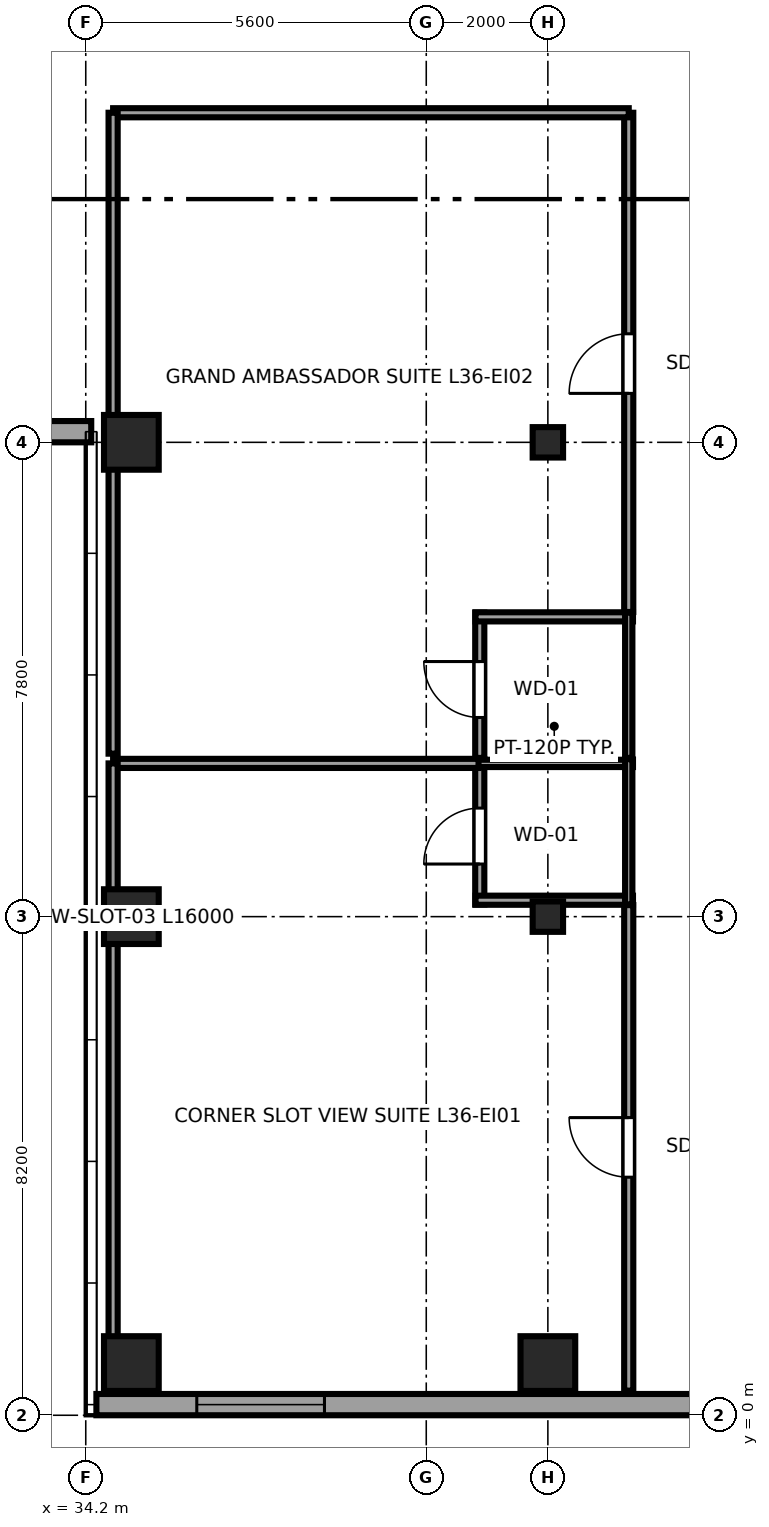
"""IFC4 building model, lengths in metres.
Left out: names, types, materials, properties, quantities, classifications, styles, units other than length and angle.
Written with IfcOpenShell. Run it as: python <this file> out.ifc"""

import sys

from ifc_helpers import new_model, si_unit, direction, frame, frame_2d, origin, origin_2d, place, context, subcontext, project, spatial, rectangle, i_section, extrude, source, transform, mapped, element, fill, save


model = new_model("IFC4")
c1 = context("Model", 3, precision=1e-05, world=origin(), true_north=direction((0.0, 1.0)))
c2 = subcontext(c1, "Body", "Model", "MODEL_VIEW")
j1 = project(units=[si_unit("LENGTHUNIT", "METRE"), si_unit("PLANEANGLEUNIT", "RADIAN")], contexts=[c1])
p1 = place(None, origin())
s1 = spatial("IfcSite", under=j1, at=p1, CompositionType="ELEMENT")
p2 = place(p1, origin())
s2 = spatial("IfcBuilding", under=s1, at=p2, CompositionType="ELEMENT")
p3 = place(p2, frame((0.0, 0.0, 139.95)))
s3 = spatial("IfcBuildingStorey", under=s2, at=p3, CompositionType="ELEMENT", Elevation=139.95)
m1 = source(origin(), c2, "Body", "SweptSolid", [
    extrude(rectangle(XDim=0.9, YDim=0.9, at=origin_2d()), origin(), (0.0, 0.0, 1.0), 3.55),
])
for number, where, z_axis, x_axis in (
    (1, (34.95, 0.85, 0.0), (0.0, 0.0, 1.0), (1.0, 0.0, 0.0)),
    (2, (34.95, 8.2, 0.0), (0.0, 0.0, 1.0), (1.0, 0.0, 0.0)),
    (3, (34.95, 16.0, 0.0), (0.0, 0.0, 1.0), (1.0, 0.0, 0.0)),
    (4, (41.8, 0.85, 0.0), (0.0, 0.0, 1.0), (1.0, 0.0, 0.0)),
):
    element("IfcColumn", number, at=place(p3, frame(where, z_axis=z_axis, x_axis=x_axis)), inside=s3, PredefinedType="COLUMN", context=c2, shape_type="MappedRepresentation", body=[
        mapped(m1, transform((0.0, 0.0, 0.0), x_axis=(1.0, 0.0, 0.0), y_axis=(0.0, 1.0, 0.0), z_axis=(0.0, 0.0, 1.0), scale=1.0)),
    ])
m2 = source(origin(), c2, "Body", "SweptSolid", [
    extrude(i_section(OverallWidth=0.5, OverallDepth=0.5, WebThickness=0.022, FlangeThickness=0.034, at=origin_2d()), origin(), (0.0, 0.0, 1.0), 3.55),
])
for number, where, z_axis, x_axis in (
    (5, (41.8, 8.2, 0.0), (0.0, 0.0, 1.0), (1.0, 0.0, 0.0)),
    (6, (41.8, 16.0, 0.0), (0.0, 0.0, 1.0), (1.0, 0.0, 0.0)),
):
    element("IfcColumn", number, at=place(p3, frame(where, z_axis=z_axis, x_axis=x_axis)), inside=s3, PredefinedType="COLUMN", context=c2, shape_type="MappedRepresentation", body=[
        mapped(m2, transform((0.0, 0.0, 0.0), x_axis=(1.0, 0.0, 0.0), y_axis=(0.0, 1.0, 0.0), z_axis=(0.0, 0.0, 1.0), scale=1.0)),
    ])
p4 = place(p3, frame((22.71, 16.175, 0.0), z_axis=(0.0, 0.0, 1.0), x_axis=(1.0, 0.0, 0.0)))
e7 = element("IfcWall", 7, at=p4, inside=s3, PredefinedType="SOLIDWALL", context=c2, shape_type="SweptSolid", body=[
    extrude(rectangle(XDim=11.58, YDim=0.35, at=frame_2d((5.79, 0.0))), origin(), (0.0, 0.0, 1.0), 2.748),
])
p5 = place(p4, frame((2.145, 0.0, 0.68)))
e8 = element("IfcOpeningElement", 8, at=p5, cuts=e7, PredefinedType="OPENING", context=c2, shape_type="SweptSolid", body=[
    extrude(rectangle(XDim=2.1, YDim=1.9, at=frame_2d((1.05, 0.95))), frame((0.0, 0.185, 0.0), z_axis=(0.0, -1.0, 0.0), x_axis=(1.0, 0.0, 0.0)), (0.0, 0.0, 1.0), 0.37),
])
p6 = place(p4, frame((7.335, 0.0, 0.68)))
e9 = element("IfcOpeningElement", 9, at=p6, cuts=e7, PredefinedType="OPENING", context=c2, shape_type="SweptSolid", body=[
    extrude(rectangle(XDim=2.1, YDim=1.9, at=frame_2d((1.05, 0.95))), frame((0.0, 0.185, 0.0), z_axis=(0.0, -1.0, 0.0), x_axis=(1.0, 0.0, 0.0)), (0.0, 0.0, 1.0), 0.37),
])
p7 = place(p3, frame((34.375, 0.175, 0.0), z_axis=(0.0, 0.0, 1.0), x_axis=(1.0, 0.0, 0.0)))
e10 = element("IfcWall", 10, at=p7, inside=s3, PredefinedType="SOLIDWALL", context=c2, shape_type="SweptSolid", body=[
    extrude(rectangle(XDim=18.008, YDim=0.35, at=frame_2d((9.004, 0.0))), origin(), (0.0, 0.0, 1.0), 3.37),
])
p8 = place(p7, frame((1.651, 0.0, 0.68)))
e11 = element("IfcOpeningElement", 11, at=p8, cuts=e10, PredefinedType="OPENING", context=c2, shape_type="SweptSolid", body=[
    extrude(rectangle(XDim=2.1, YDim=1.9, at=frame_2d((1.05, 0.95))), frame((0.0, 0.185, 0.0), z_axis=(0.0, -1.0, 0.0), x_axis=(1.0, 0.0, 0.0)), (0.0, 0.0, 1.0), 0.37),
])
p9 = place(p7, frame((11.105, 0.0, 0.68)))
e12 = element("IfcOpeningElement", 12, at=p9, cuts=e10, PredefinedType="OPENING", context=c2, shape_type="SweptSolid", body=[
    extrude(rectangle(XDim=2.1, YDim=1.9, at=frame_2d((1.05, 0.95))), frame((0.0, 0.185, 0.0), z_axis=(0.0, -1.0, 0.0), x_axis=(1.0, 0.0, 0.0)), (0.0, 0.0, 1.0), 0.37),
])
p10 = place(p3, frame((40.68, 8.4, 0.0), z_axis=(0.0, 0.0, 1.0), x_axis=(0.0, 1.0, 0.0)))
e13 = element("IfcWall", 13, at=p10, inside=s3, PredefinedType="PARTITIONING", context=c2, shape_type="SweptSolid", body=[
    extrude(rectangle(XDim=2.39, YDim=0.15, at=frame_2d((1.195, 0.0))), origin(), (0.0, 0.0, 1.0), 3.37),
])
p11 = place(p10, frame((0.665, 0.0, 0.0)))
e14 = element("IfcOpeningElement", 14, at=p11, cuts=e13, PredefinedType="OPENING", context=c2, shape_type="SweptSolid", body=[
    extrude(rectangle(XDim=0.92, YDim=2.01, at=frame_2d((0.46, 1.005))), frame((0.0, 0.085, 0.0), z_axis=(0.0, -1.0, 0.0), x_axis=(1.0, 0.0, 0.0)), (0.0, 0.0, 1.0), 0.17),
])
p12 = place(p3, frame((40.61, 8.47, 0.0), z_axis=(0.0, 0.0, 1.0), x_axis=(1.0, 0.0, 0.0)))
e15 = element("IfcWall", 15, at=p12, inside=s3, PredefinedType="PARTITIONING", context=c2, shape_type="SweptSolid", body=[
    extrude(rectangle(XDim=2.59, YDim=0.15, at=frame_2d((1.295, 0.0))), origin(), (0.0, 0.0, 1.0), 3.37),
])
p13 = place(p3, frame((40.61, 10.72, 0.0), z_axis=(0.0, 0.0, 1.0), x_axis=(1.0, 0.0, 0.0)))
e16 = element("IfcWall", 16, at=p13, inside=s3, PredefinedType="PLUMBINGWALL", context=c2, shape_type="SweptSolid", body=[
    extrude(rectangle(XDim=2.59, YDim=0.12, at=frame_2d((1.295, 0.0))), origin(), (0.0, 0.0, 1.0), 3.37),
])
p14 = place(p3, frame((43.13, 8.4, 0.0), z_axis=(0.0, 0.0, 1.0), x_axis=(0.0, 1.0, 0.0)))
e17 = element("IfcWall", 17, at=p14, inside=s3, PredefinedType="PLUMBINGWALL", context=c2, shape_type="SweptSolid", body=[
    extrude(rectangle(XDim=2.39, YDim=0.12, at=frame_2d((1.195, 0.0))), origin(), (0.0, 0.0, 1.0), 3.37),
])
p15 = place(p3, frame((40.68, 10.81, 0.0), z_axis=(0.0, 0.0, 1.0), x_axis=(0.0, 1.0, 0.0)))
e18 = element("IfcWall", 18, at=p15, inside=s3, PredefinedType="PARTITIONING", context=c2, shape_type="SweptSolid", body=[
    extrude(rectangle(XDim=2.39, YDim=0.15, at=frame_2d((1.195, 0.0))), origin(), (0.0, 0.0, 1.0), 3.37),
])
p16 = place(p15, frame((0.665, 0.0, 0.0)))
e19 = element("IfcOpeningElement", 19, at=p16, cuts=e18, PredefinedType="OPENING", context=c2, shape_type="SweptSolid", body=[
    extrude(rectangle(XDim=0.92, YDim=2.01, at=frame_2d((0.46, 1.005))), frame((0.0, 0.085, 0.0), z_axis=(0.0, -1.0, 0.0), x_axis=(1.0, 0.0, 0.0)), (0.0, 0.0, 1.0), 0.17),
])
p17 = place(p3, frame((40.61, 13.13, 0.0), z_axis=(0.0, 0.0, 1.0), x_axis=(1.0, 0.0, 0.0)))
e20 = element("IfcWall", 20, at=p17, inside=s3, PredefinedType="PARTITIONING", context=c2, shape_type="SweptSolid", body=[
    extrude(rectangle(XDim=2.59, YDim=0.15, at=frame_2d((1.295, 0.0))), origin(), (0.0, 0.0, 1.0), 3.37),
])
p18 = place(p3, frame((43.13, 10.81, 0.0), z_axis=(0.0, 0.0, 1.0), x_axis=(0.0, 1.0, 0.0)))
e21 = element("IfcWall", 21, at=p18, inside=s3, PredefinedType="PLUMBINGWALL", context=c2, shape_type="SweptSolid", body=[
    extrude(rectangle(XDim=2.39, YDim=0.12, at=frame_2d((1.195, 0.0))), origin(), (0.0, 0.0, 1.0), 3.37),
])
p19 = place(p3, frame((43.13, 0.405, 0.0), z_axis=(0.0, 0.0, 1.0), x_axis=(0.0, 1.0, 0.0)))
e22 = element("IfcWall", 22, at=p19, inside=s3, PredefinedType="PARTITIONING", context=c2, shape_type="SweptSolid", body=[
    extrude(rectangle(XDim=7.985, YDim=0.15, at=frame_2d((3.992, 0.0))), origin(), (0.0, 0.0, 1.0), 3.37),
])
p20 = place(p19, frame((3.51, 0.0, 0.0)))
e23 = element("IfcOpeningElement", 23, at=p20, cuts=e22, PredefinedType="OPENING", context=c2, shape_type="SweptSolid", body=[
    extrude(rectangle(XDim=0.98, YDim=2.12, at=frame_2d((0.49, 1.06))), frame((0.0, 0.085, 0.0), z_axis=(0.0, -1.0, 0.0), x_axis=(1.0, 0.0, 0.0)), (0.0, 0.0, 1.0), 0.17),
])
p21 = place(p3, frame((34.65, 10.72, 0.0), z_axis=(0.0, 0.0, 1.0), x_axis=(1.0, 0.0, 0.0)))
e24 = element("IfcWall", 24, at=p21, inside=s3, PredefinedType="PARTITIONING", context=c2, shape_type="SweptSolid", body=[
    extrude(rectangle(XDim=6.01, YDim=0.15, at=frame_2d((3.005, 0.0))), origin(), (0.0, 0.0, 1.0), 3.37),
])
p22 = place(p3, frame((34.65, 0.405, 0.0), z_axis=(0.0, 0.0, 1.0), x_axis=(0.0, 1.0, 0.0)))
e25 = element("IfcWall", 25, at=p22, inside=s3, PredefinedType="PARTITIONING", context=c2, shape_type="SweptSolid", body=[
    extrude(rectangle(XDim=10.315, YDim=0.15, at=frame_2d((5.157, 0.0))), origin(), (0.0, 0.0, 1.0), 3.37),
])
p23 = place(p3, frame((43.13, 13.21, 0.0), z_axis=(0.0, 0.0, 1.0), x_axis=(0.0, 1.0, 0.0)))
e26 = element("IfcWall", 26, at=p23, inside=s3, PredefinedType="PARTITIONING", context=c2, shape_type="SweptSolid", body=[
    extrude(rectangle(XDim=8.21, YDim=0.15, at=frame_2d((4.105, 0.0))), origin(), (0.0, 0.0, 1.0), 3.37),
])
p24 = place(p23, frame((3.595, 0.0, 0.0)))
e27 = element("IfcOpeningElement", 27, at=p24, cuts=e26, PredefinedType="OPENING", context=c2, shape_type="SweptSolid", body=[
    extrude(rectangle(XDim=0.98, YDim=2.12, at=frame_2d((0.49, 1.06))), frame((0.0, 0.085, 0.0), z_axis=(0.0, -1.0, 0.0), x_axis=(1.0, 0.0, 0.0)), (0.0, 0.0, 1.0), 0.17),
])
p25 = place(p3, frame((34.65, 21.42, 0.0), z_axis=(0.0, 0.0, 1.0), x_axis=(1.0, 0.0, 0.0)))
e28 = element("IfcWall", 28, at=p25, inside=s3, PredefinedType="PARTITIONING", context=c2, shape_type="SweptSolid", body=[
    extrude(rectangle(XDim=8.48, YDim=0.15, at=frame_2d((4.24, 0.0))), origin(), (0.0, 0.0, 1.0), 3.37),
])
p26 = place(p3, frame((34.65, 10.88, 0.0), z_axis=(0.0, 0.0, 1.0), x_axis=(0.0, 1.0, 0.0)))
e29 = element("IfcWall", 29, at=p26, inside=s3, PredefinedType="PARTITIONING", context=c2, shape_type="SweptSolid", body=[
    extrude(rectangle(XDim=10.54, YDim=0.15, at=frame_2d((5.27, 0.0))), origin(), (0.0, 0.0, 1.0), 3.37),
])
m3 = source(origin(), c2, "Body", "SweptSolid", [
    extrude(rectangle(XDim=2.1, YDim=1.9, at=frame_2d((1.05, 0.95))), frame((0.0, 0.09, 0.0), z_axis=(0.0, -1.0, 0.0), x_axis=(1.0, 0.0, 0.0)), (0.0, 0.0, 1.0), 0.06),
])
p27 = place(p8, origin())
e30 = element("IfcWindow", 30, at=p27, inside=s3, PartitioningType="TRIPLE_PANEL_HORIZONTAL", PredefinedType="WINDOW", context=c2, shape_type="MappedRepresentation", body=[
    mapped(m3, transform((0.0, 0.0, 0.0), x_axis=(1.0, 0.0, 0.0), y_axis=(0.0, 1.0, 0.0), z_axis=(0.0, 0.0, 1.0), scale=1.0)),
])
fill(e11, e30)
m4 = source(origin(), c2, "Body", "SweptSolid", [
    extrude(rectangle(XDim=0.92, YDim=2.01, at=frame_2d((0.46, 1.005))), frame((0.0, 0.025, 0.0), z_axis=(0.0, -1.0, 0.0), x_axis=(1.0, 0.0, 0.0)), (0.0, 0.0, 1.0), 0.05),
])
p28 = place(p11, origin())
e31 = element("IfcDoor", 31, at=p28, inside=s3, OperationType="SINGLE_SWING_LEFT", PredefinedType="DOOR", context=c2, shape_type="MappedRepresentation", body=[
    mapped(m4, transform((0.0, 0.0, 0.0), x_axis=(1.0, 0.0, 0.0), y_axis=(0.0, 1.0, 0.0), z_axis=(0.0, 0.0, 1.0), scale=1.0)),
])
fill(e14, e31)
p29 = place(p16, origin())
e32 = element("IfcDoor", 32, at=p29, inside=s3, OperationType="SINGLE_SWING_RIGHT", PredefinedType="DOOR", context=c2, shape_type="MappedRepresentation", body=[
    mapped(m4, transform((0.0, 0.0, 0.0), x_axis=(1.0, 0.0, 0.0), y_axis=(0.0, 1.0, 0.0), z_axis=(0.0, 0.0, 1.0), scale=1.0)),
])
fill(e19, e32)
m5 = source(origin(), c2, "Body", "SweptSolid", [
    extrude(rectangle(XDim=0.98, YDim=2.12, at=frame_2d((0.49, 1.06))), frame((0.0, 0.025, 0.0), z_axis=(0.0, -1.0, 0.0), x_axis=(1.0, 0.0, 0.0)), (0.0, 0.0, 1.0), 0.05),
])
p30 = place(p20, origin())
e33 = element("IfcDoor", 33, at=p30, inside=s3, OperationType="SINGLE_SWING_RIGHT", PredefinedType="DOOR", context=c2, shape_type="MappedRepresentation", body=[
    mapped(m5, transform((0.0, 0.0, 0.0), x_axis=(1.0, 0.0, 0.0), y_axis=(0.0, 1.0, 0.0), z_axis=(0.0, 0.0, 1.0), scale=1.0)),
])
fill(e23, e33)
p31 = place(p24, origin())
e34 = element("IfcDoor", 34, at=p31, inside=s3, OperationType="SINGLE_SWING_LEFT", PredefinedType="DOOR", context=c2, shape_type="MappedRepresentation", body=[
    mapped(m5, transform((0.0, 0.0, 0.0), x_axis=(1.0, 0.0, 0.0), y_axis=(0.0, 1.0, 0.0), z_axis=(0.0, 0.0, 1.0), scale=1.0)),
])
fill(e27, e34)
save(model, sys.argv[1])
